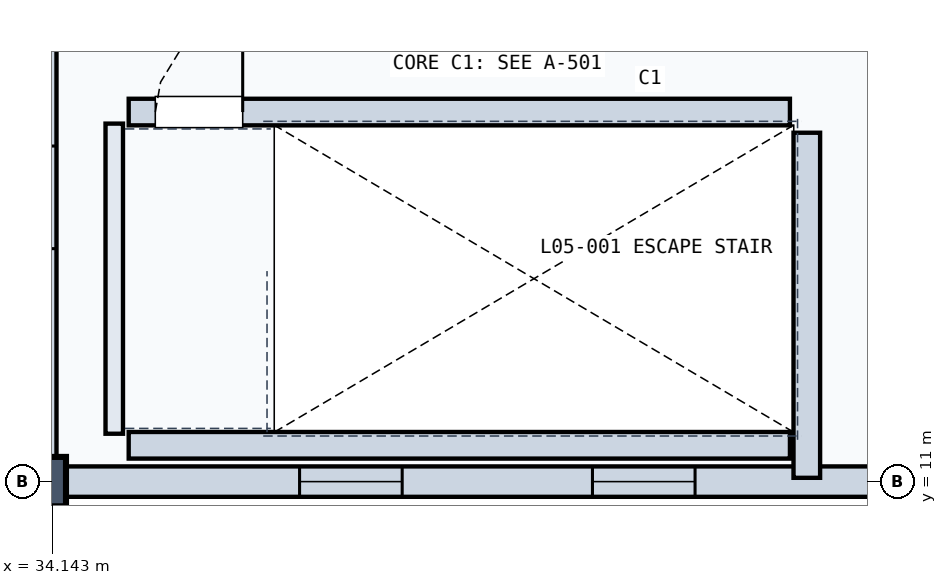
"""IFC4 building model, lengths in metres.
Left out: names, types, materials, properties, quantities, classifications, styles, units other than length and angle.
Written with IfcOpenShell. Run it as: python <this file> out.ifc"""

import sys

from ifc_helpers import new_model, si_unit, direction, frame, frame_2d, origin, origin_2d, place, context, subcontext, project, spatial, rectangle, extrude, element, fill, save


model = new_model("IFC4")
c1 = context("Model", 3, precision=1e-05, world=origin(), true_north=direction((0.0, 1.0)))
c2 = subcontext(c1, "Body", "Model", "MODEL_VIEW")
j1 = project(units=[si_unit("LENGTHUNIT", "METRE"), si_unit("PLANEANGLEUNIT", "RADIAN")], contexts=[c1])
p1 = place(None, origin())
s1 = spatial("IfcSite", under=j1, at=p1, CompositionType="ELEMENT")
p2 = place(p1, origin())
s2 = spatial("IfcBuilding", under=s1, at=p2, CompositionType="ELEMENT")
p3 = place(p2, frame((0.0, 0.0, 24.3)))
s3 = spatial("IfcBuildingStorey", under=s2, at=p3, CompositionType="ELEMENT", Elevation=24.3)
p4 = place(p3, frame((34.0, 11.0, 0.0), z_axis=(0.0, 0.0, 1.0), x_axis=(1.0, 0.0, 0.0)))
e1 = element("IfcColumn", 1, at=p4, inside=s3, PredefinedType="COLUMN", context=c2, shape_type="SweptSolid", body=[
    extrude(rectangle(XDim=0.65, YDim=0.65, at=origin_2d()), origin(), (0.0, 0.0, 1.0), 5.4),
])
p5 = place(p3, frame((34.22, 11.0, 0.0), z_axis=(0.0, 0.0, 1.0), x_axis=(1.0, 0.0, 0.0)))
e2 = element("IfcWall", 2, at=p5, inside=s3, PredefinedType="SOLIDWALL", context=c2, shape_type="SweptSolid", body=[
    extrude(rectangle(XDim=11.56, YDim=0.4, at=frame_2d((5.78, 0.0))), origin(), (0.0, 0.0, 1.0), 5.185),
])
p6 = place(p5, frame((3.178, 0.0, 0.8)))
e3 = element("IfcOpeningElement", 3, at=p6, cuts=e2, PredefinedType="OPENING", context=c2, shape_type="SweptSolid", body=[
    extrude(rectangle(XDim=1.35, YDim=2.1, at=frame_2d((0.675, 1.05))), frame((0.0, 0.21, 0.0), z_axis=(0.0, -1.0, 0.0), x_axis=(1.0, 0.0, 0.0)), (0.0, 0.0, 1.0), 0.42),
])
p7 = place(p5, frame((7.032, 0.0, 0.8)))
e4 = element("IfcOpeningElement", 4, at=p7, cuts=e2, PredefinedType="OPENING", context=c2, shape_type="SweptSolid", body=[
    extrude(rectangle(XDim=1.35, YDim=2.1, at=frame_2d((0.675, 1.05))), frame((0.0, 0.21, 0.0), z_axis=(0.0, -1.0, 0.0), x_axis=(1.0, 0.0, 0.0)), (0.0, 0.0, 1.0), 0.42),
])
p8 = place(p3, frame((34.0, 11.22, 0.0), z_axis=(0.0, 0.0, 1.0), x_axis=(0.0, 1.0, 0.0)))
e5 = element("IfcWall", 5, at=p8, inside=s3, PredefinedType="SOLIDWALL", context=c2, shape_type="SweptSolid", body=[
    extrude(rectangle(XDim=10.56, YDim=0.4, at=frame_2d((5.28, 0.0))), origin(), (0.0, 0.0, 1.0), 5.185),
])
p9 = place(p8, frame((2.845, 0.0, 0.8)))
e6 = element("IfcOpeningElement", 6, at=p9, cuts=e5, PredefinedType="OPENING", context=c2, shape_type="SweptSolid", body=[
    extrude(rectangle(XDim=1.35, YDim=2.1, at=frame_2d((0.675, 1.05))), frame((0.0, 0.21, 0.0), z_axis=(0.0, -1.0, 0.0), x_axis=(1.0, 0.0, 0.0)), (0.0, 0.0, 1.0), 0.42),
])
p10 = place(p8, frame((6.365, 0.0, 0.8)))
e7 = element("IfcOpeningElement", 7, at=p10, cuts=e5, PredefinedType="OPENING", context=c2, shape_type="SweptSolid", body=[
    extrude(rectangle(XDim=1.35, YDim=2.1, at=frame_2d((0.675, 1.05))), frame((0.0, 0.21, 0.0), z_axis=(0.0, -1.0, 0.0), x_axis=(1.0, 0.0, 0.0)), (0.0, 0.0, 1.0), 0.42),
])
p11 = place(p3, frame((34.96, 11.63, 0.0), z_axis=(0.0, 0.0, 1.0), x_axis=(0.0, 1.0, 0.0)))
e8 = element("IfcWall", 8, at=p11, inside=s3, PredefinedType="SOLIDWALL", context=c2, shape_type="SweptSolid", body=[
    extrude(rectangle(XDim=4.08, YDim=0.23, at=frame_2d((2.04, 0.0))), origin(), (0.0, 0.0, 1.0), 5.18),
])
p12 = place(p3, frame((44.072, 11.05, 0.0), z_axis=(0.0, 0.0, 1.0), x_axis=(0.0, 1.0, 0.0)))
e9 = element("IfcWall", 9, at=p12, inside=s3, PredefinedType="SOLIDWALL", context=c2, shape_type="SweptSolid", body=[
    extrude(rectangle(XDim=4.54, YDim=0.35, at=frame_2d((2.27, 0.0))), origin(), (0.0, 0.0, 1.0), 5.18),
])
p13 = place(p3, frame((35.15, 11.478, 0.0), z_axis=(0.0, 0.0, 1.0), x_axis=(1.0, 0.0, 0.0)))
e10 = element("IfcWall", 10, at=p13, inside=s3, PredefinedType="SOLIDWALL", context=c2, shape_type="SweptSolid", body=[
    extrude(rectangle(XDim=8.7, YDim=0.35, at=frame_2d((4.35, 0.0))), origin(), (0.0, 0.0, 1.0), 5.18),
])
p14 = place(p3, frame((35.15, 15.862, 0.0), z_axis=(0.0, 0.0, 1.0), x_axis=(1.0, 0.0, 0.0)))
e11 = element("IfcWall", 11, at=p14, inside=s3, PredefinedType="SOLIDWALL", context=c2, shape_type="SweptSolid", body=[
    extrude(rectangle(XDim=8.7, YDim=0.35, at=frame_2d((4.35, 0.0))), origin(), (0.0, 0.0, 1.0), 5.18),
])
p15 = place(p14, frame((0.35, 0.0, 0.0)))
e12 = element("IfcOpeningElement", 12, at=p15, cuts=e11, PredefinedType="OPENING", context=c2, shape_type="SweptSolid", body=[
    extrude(rectangle(XDim=1.15, YDim=2.2, at=frame_2d((0.575, 1.1))), frame((0.0, 0.185, 0.0), z_axis=(0.0, -1.0, 0.0), x_axis=(1.0, 0.0, 0.0)), (0.0, 0.0, 1.0), 0.37),
])
p16 = place(p6, origin())
e13 = element("IfcWindow", 13, at=p16, inside=s3, PartitioningType="SINGLE_PANEL", PredefinedType="WINDOW", context=c2, shape_type="SweptSolid", body=[
    extrude(rectangle(XDim=1.35, YDim=2.1, at=frame_2d((0.675, 1.05))), frame((0.0, 0.03, 0.0), z_axis=(0.0, -1.0, 0.0), x_axis=(1.0, 0.0, 0.0)), (0.0, 0.0, 1.0), 0.06),
])
fill(e3, e13)
p17 = place(p7, origin())
e14 = element("IfcWindow", 14, at=p17, inside=s3, PartitioningType="SINGLE_PANEL", PredefinedType="WINDOW", context=c2, shape_type="SweptSolid", body=[
    extrude(rectangle(XDim=1.35, YDim=2.1, at=frame_2d((0.675, 1.05))), frame((0.0, 0.03, 0.0), z_axis=(0.0, -1.0, 0.0), x_axis=(1.0, 0.0, 0.0)), (0.0, 0.0, 1.0), 0.06),
])
fill(e4, e14)
p18 = place(p15, origin())
e15 = element("IfcDoor", 15, at=p18, inside=s3, OperationType="SINGLE_SWING_RIGHT", PredefinedType="DOOR", context=c2, shape_type="SweptSolid", body=[
    extrude(rectangle(XDim=1.15, YDim=2.2, at=frame_2d((0.575, 1.1))), frame((0.0, 0.025, 0.0), z_axis=(0.0, -1.0, 0.0), x_axis=(1.0, 0.0, 0.0)), (0.0, 0.0, 1.0), 0.05),
])
fill(e12, e15)
save(model, sys.argv[1])
